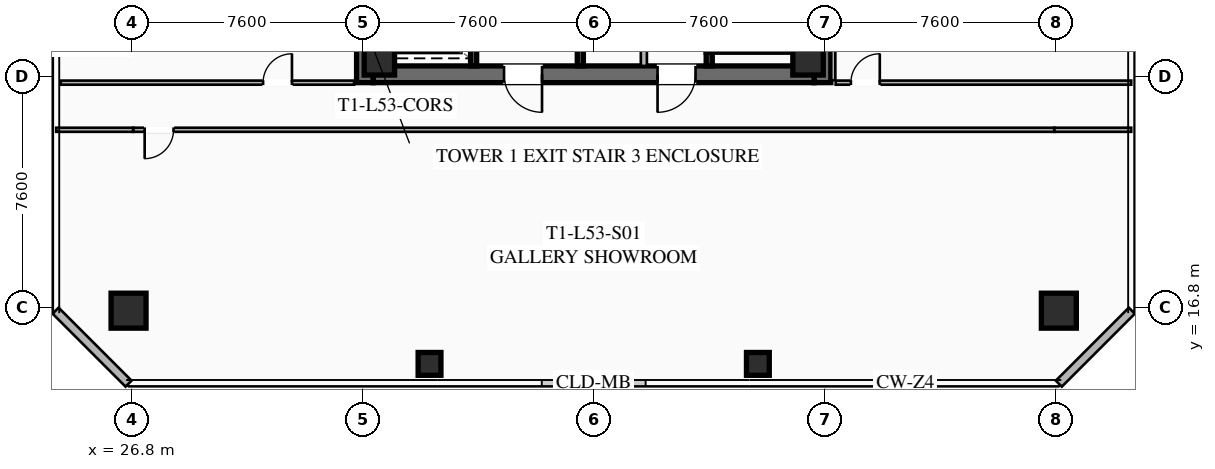
"""IFC4 building model, lengths in metres.
Left out: names, types, materials, properties, quantities, classifications, styles, units other than length and angle.
Written with IfcOpenShell. Run it as: python <this file> out.ifc"""

import sys

from ifc_helpers import new_model, si_unit, direction, frame, frame_2d, origin, origin_2d, place, context, subcontext, project, spatial, rectangle, hollow_rectangle, extrude, element, fill, save


model = new_model("IFC4")
c1 = context("Model", 3, precision=1e-05, world=origin(), true_north=direction((0.0, 1.0)))
c2 = subcontext(c1, "Body", "Model", "MODEL_VIEW")
j1 = project(units=[si_unit("LENGTHUNIT", "METRE"), si_unit("PLANEANGLEUNIT", "RADIAN")], contexts=[c1])
p1 = place(None, origin())
s1 = spatial("IfcSite", under=j1, at=p1, CompositionType="ELEMENT")
p2 = place(p1, origin())
s2 = spatial("IfcBuilding", under=s1, at=p2, CompositionType="ELEMENT")
p3 = place(p2, frame((0.0, 0.0, 196.05)))
s3 = spatial("IfcBuildingStorey", under=s2, at=p3, CompositionType="ELEMENT", Elevation=196.05)
for number, where, z_axis, x_axis in (
    (1, (34.475, 24.2, 0.0), (0.0, 0.0, 1.0), (0.0, 1.0, 0.0)),
    (2, (49.525, 39.8, 0.0), (0.0, 0.0, 1.0), (0.0, -1.0, 0.0)),
):
    element("IfcWall", number, at=place(p3, frame(where, z_axis=z_axis, x_axis=x_axis)), inside=s3, PredefinedType="SHEAR", context=c2, shape_type="SweptSolid", body=[
        extrude(rectangle(XDim=15.6, YDim=0.55, at=frame_2d((7.8, 0.0))), origin(), (0.0, 0.0, 1.0), 3.55),
    ])
p4 = place(p3, frame((49.25, 24.475, 0.0), z_axis=(0.0, 0.0, 1.0), x_axis=(-1.0, 0.0, 0.0)))
e3 = element("IfcWall", 3, at=p4, inside=s3, PredefinedType="SHEAR", context=c2, shape_type="SweptSolid", body=[
    extrude(rectangle(XDim=14.5, YDim=0.55, at=frame_2d((7.25, 0.0))), origin(), (0.0, 0.0, 1.0), 3.55),
])
p5 = place(p4, frame((8.95, 0.0, 0.0)))
e4 = element("IfcOpeningElement", 4, at=p5, cuts=e3, PredefinedType="OPENING", context=c2, shape_type="SweptSolid", body=[
    extrude(rectangle(XDim=1.25, YDim=2.25, at=frame_2d((0.625, 1.125))), frame((0.0, 0.285, 0.0), z_axis=(0.0, -1.0, 0.0), x_axis=(1.0, 0.0, 0.0)), (0.0, 0.0, 1.0), 0.57),
])
p6 = place(p4, frame((3.9, 0.0, 0.0)))
e5 = element("IfcOpeningElement", 5, at=p6, cuts=e3, PredefinedType="OPENING", context=c2, shape_type="SweptSolid", body=[
    extrude(rectangle(XDim=1.25, YDim=2.25, at=frame_2d((0.625, 1.125))), frame((0.0, 0.285, 0.0), z_axis=(0.0, -1.0, 0.0), x_axis=(1.0, 0.0, 0.0)), (0.0, 0.0, 1.0), 0.57),
])
for number, where, z_axis, x_axis in (
    (6, (34.95, 24.95, 0.0), (0.0, 0.0, 1.0), (1.0, 0.0, 0.0)),
    (7, (49.05, 24.95, 0.0), (0.0, 0.0, 1.0), (1.0, 0.0, 0.0)),
):
    element("IfcColumn", number, at=place(p3, frame(where, z_axis=z_axis, x_axis=x_axis)), inside=s3, PredefinedType="COLUMN", context=c2, shape_type="SweptSolid", body=[
        extrude(hollow_rectangle(XDim=1.0, YDim=1.0, WallThickness=0.04, at=origin_2d()), origin(), (0.0, 0.0, 1.0), 3.25),
    ])
for number, where, z_axis, x_axis in (
    (8, (26.7, 16.7, 0.0), (0.0, 0.0, 1.0), (1.0, 0.0, 0.0)),
    (9, (57.3, 16.7, 0.0), (0.0, 0.0, 1.0), (1.0, 0.0, 0.0)),
):
    element("IfcColumn", number, at=place(p3, frame(where, z_axis=z_axis, x_axis=x_axis)), inside=s3, PredefinedType="COLUMN", context=c2, shape_type="SweptSolid", body=[
        extrude(hollow_rectangle(XDim=1.15, YDim=1.15, WallThickness=0.045, at=origin_2d()), origin(), (0.0, 0.0, 1.0), 3.25),
    ])
for number, where, z_axis, x_axis in (
    (10, (36.6, 14.95, 0.0), (0.0, 0.0, 1.0), (1.0, 0.0, 0.0)),
    (11, (47.4, 14.95, 0.0), (0.0, 0.0, 1.0), (1.0, 0.0, 0.0)),
):
    element("IfcColumn", number, at=place(p3, frame(where, z_axis=z_axis, x_axis=x_axis)), inside=s3, PredefinedType="COLUMN", context=c2, shape_type="SweptSolid", body=[
        extrude(hollow_rectangle(XDim=0.75, YDim=0.75, WallThickness=0.032, at=origin_2d()), origin(), (0.0, 0.0, 1.0), 3.25),
    ])
for number, where, z_axis, x_axis in (
    (12, (26.7, 14.3, 0.0), (0.0, 0.0, 1.0), (-0.707, 0.707, 0.0)),
    (13, (59.7, 16.7, 0.0), (0.0, 0.0, 1.0), (-0.707, -0.707, 0.0)),
):
    element("IfcWall", number, at=place(p3, frame(where, z_axis=z_axis, x_axis=x_axis)), inside=s3, PredefinedType="SOLIDWALL", context=c2, shape_type="SweptSolid", body=[
        extrude(rectangle(XDim=3.394, YDim=0.28, at=frame_2d((1.697, 0.0))), origin(), (0.0, 0.0, 1.0), 3.25),
    ])
p7 = place(p3, frame((45.8, 32.8, 0.0), z_axis=(0.0, 0.0, 1.0), x_axis=(0.0, -1.0, 0.0)))
e14 = element("IfcWall", 14, at=p7, inside=s3, PredefinedType="SHEAR", context=c2, shape_type="SweptSolid", body=[
    extrude(rectangle(XDim=8.05, YDim=0.2, at=frame_2d((4.025, 0.0))), origin(), (0.0, 0.0, 1.0), 3.25),
])
p8 = place(p7, frame((0.45, 0.0, 0.0)))
e15 = element("IfcOpeningElement", 15, at=p8, cuts=e14, PredefinedType="OPENING", context=c2, shape_type="SweptSolid", body=[
    extrude(rectangle(XDim=1.15, YDim=2.2, at=frame_2d((0.575, 1.1))), frame((0.0, 0.11, 0.0), z_axis=(0.0, -1.0, 0.0), x_axis=(1.0, 0.0, 0.0)), (0.0, 0.0, 1.0), 0.22),
])
p9 = place(p3, frame((41.56, 24.75, 0.0), z_axis=(0.0, 0.0, 1.0), x_axis=(0.0, 1.0, 0.0)))
e16 = element("IfcWall", 16, at=p9, inside=s3, PredefinedType="SHEAR", context=c2, shape_type="SweptSolid", body=[
    extrude(rectangle(XDim=14.5, YDim=0.2, at=frame_2d((7.25, 0.0))), origin(), (0.0, 0.0, 1.0), 3.25),
])
p10 = place(p3, frame((38.05, 24.75, 0.0), z_axis=(0.0, 0.0, 1.0), x_axis=(0.0, 1.0, 0.0)))
e17 = element("IfcWall", 17, at=p10, inside=s3, PredefinedType="SHEAR", context=c2, shape_type="SweptSolid", body=[
    extrude(rectangle(XDim=6.45, YDim=0.2, at=frame_2d((3.225, 0.0))), origin(), (0.0, 0.0, 1.0), 3.25),
])
p11 = place(p10, frame((4.875, 0.0, 0.0)))
e18 = element("IfcOpeningElement", 18, at=p11, cuts=e17, PredefinedType="OPENING", context=c2, shape_type="SweptSolid", body=[
    extrude(rectangle(XDim=1.3, YDim=2.25, at=frame_2d((0.65, 1.125))), frame((0.0, 0.11, 0.0), z_axis=(0.0, -1.0, 0.0), x_axis=(1.0, 0.0, 0.0)), (0.0, 0.0, 1.0), 0.22),
])
p12 = place(p10, frame((2.875, 0.0, 0.0)))
e19 = element("IfcOpeningElement", 19, at=p12, cuts=e17, PredefinedType="OPENING", context=c2, shape_type="SweptSolid", body=[
    extrude(rectangle(XDim=1.3, YDim=2.25, at=frame_2d((0.65, 1.125))), frame((0.0, 0.11, 0.0), z_axis=(0.0, -1.0, 0.0), x_axis=(1.0, 0.0, 0.0)), (0.0, 0.0, 1.0), 0.22),
])
p13 = place(p10, frame((0.675, 0.0, 0.0)))
e20 = element("IfcOpeningElement", 20, at=p13, cuts=e17, PredefinedType="OPENING", context=c2, shape_type="SweptSolid", body=[
    extrude(rectangle(XDim=1.3, YDim=2.25, at=frame_2d((0.65, 1.125))), frame((0.0, 0.11, 0.0), z_axis=(0.0, -1.0, 0.0), x_axis=(1.0, 0.0, 0.0)), (0.0, 0.0, 1.0), 0.22),
])
p14 = place(p3, frame((43.65, 24.75, 0.0), z_axis=(0.0, 0.0, 1.0), x_axis=(0.0, 1.0, 0.0)))
e21 = element("IfcWall", 21, at=p14, inside=s3, PredefinedType="SOLIDWALL", context=c2, shape_type="SweptSolid", body=[
    extrude(rectangle(XDim=6.9, YDim=0.2, at=frame_2d((3.45, 0.0))), origin(), (0.0, 0.0, 1.0), 2.393),
])
p15 = place(p14, frame((0.85, 0.0, 0.0)))
e22 = element("IfcOpeningElement", 22, at=p15, cuts=e21, PredefinedType="OPENING", context=c2, shape_type="SweptSolid", body=[
    extrude(rectangle(XDim=0.95, YDim=2.05, at=frame_2d((0.475, 1.025))), frame((0.0, 0.11, 0.0), z_axis=(0.0, -1.0, 0.0), x_axis=(1.0, 0.0, 0.0)), (0.0, 0.0, 1.0), 0.22),
])
p16 = place(p14, frame((4.8, 0.0, 0.0)))
e23 = element("IfcOpeningElement", 23, at=p16, cuts=e21, PredefinedType="OPENING", context=c2, shape_type="SweptSolid", body=[
    extrude(rectangle(XDim=1.05, YDim=2.2, at=frame_2d((0.525, 1.1))), frame((0.0, 0.11, 0.0), z_axis=(0.0, -1.0, 0.0), x_axis=(1.0, 0.0, 0.0)), (0.0, 0.0, 1.0), 0.22),
])
p17 = place(p3, frame((57.15, 22.65, 0.0), z_axis=(0.0, 0.0, 1.0), x_axis=(-1.0, 0.0, 0.0)))
e24 = element("IfcWall", 24, at=p17, inside=s3, PredefinedType="PARTITIONING", context=c2, shape_type="SweptSolid", body=[
    extrude(rectangle(XDim=30.3, YDim=0.135, at=frame_2d((15.15, 0.0))), origin(), (0.0, 0.0, 1.0), 2.393),
])
p18 = place(p17, frame((28.97, 0.0, 0.0)))
e25 = element("IfcOpeningElement", 25, at=p18, cuts=e24, PredefinedType="OPENING", context=c2, shape_type="SweptSolid", body=[
    extrude(rectangle(XDim=0.95, YDim=2.05, at=frame_2d((0.475, 1.025))), frame((0.0, 0.077, 0.0), z_axis=(0.0, -1.0, 0.0), x_axis=(1.0, 0.0, 0.0)), (0.0, 0.0, 1.0), 0.155),
])
for number, where, z_axis, x_axis in (
    (26, (24.32, 22.65, 0.0), (0.0, 0.0, 1.0), (1.0, 0.0, 0.0)),
    (27, (57.15, 22.65, 0.0), (0.0, 0.0, 1.0), (1.0, 0.0, 0.0)),
):
    element("IfcWall", number, at=place(p3, frame(where, z_axis=z_axis, x_axis=x_axis)), inside=s3, PredefinedType="PARTITIONING", context=c2, shape_type="SweptSolid", body=[
        extrude(rectangle(XDim=2.53, YDim=0.135, at=frame_2d((1.265, 0.0))), origin(), (0.0, 0.0, 1.0), 2.393),
    ])
p19 = place(p3, frame((49.88, 39.72, 0.0), z_axis=(0.0, 0.0, 1.0), x_axis=(0.0, -1.0, 0.0)))
e28 = element("IfcWall", 28, at=p19, inside=s3, PredefinedType="PARTITIONING", context=c2, shape_type="SweptSolid", body=[
    extrude(rectangle(XDim=15.44, YDim=0.135, at=frame_2d((7.72, 0.0))), origin(), (0.0, 0.0, 1.0), 2.393),
])
p20 = place(p3, frame((49.96, 24.2, 0.0), z_axis=(0.0, 0.0, 1.0), x_axis=(1.0, 0.0, 0.0)))
e29 = element("IfcWall", 29, at=p20, inside=s3, PredefinedType="PARTITIONING", context=c2, shape_type="SweptSolid", body=[
    extrude(rectangle(XDim=9.72, YDim=0.135, at=frame_2d((4.86, 0.0))), origin(), (0.0, 0.0, 1.0), 2.393),
])
p21 = place(p20, frame((0.5, 0.0, 0.0)))
e30 = element("IfcOpeningElement", 30, at=p21, cuts=e29, PredefinedType="OPENING", context=c2, shape_type="SweptSolid", body=[
    extrude(rectangle(XDim=0.95, YDim=2.05, at=frame_2d((0.475, 1.025))), frame((0.0, 0.077, 0.0), z_axis=(0.0, -1.0, 0.0), x_axis=(1.0, 0.0, 0.0)), (0.0, 0.0, 1.0), 0.155),
])
p22 = place(p3, frame((24.47, 24.2, 0.0), z_axis=(0.0, 0.0, 1.0), x_axis=(1.0, 0.0, 0.0)))
e31 = element("IfcWall", 31, at=p22, inside=s3, PredefinedType="PARTITIONING", context=c2, shape_type="SweptSolid", body=[
    extrude(rectangle(XDim=9.65, YDim=0.135, at=frame_2d((4.825, 0.0))), origin(), (0.0, 0.0, 1.0), 2.393),
])
p23 = place(p22, frame((6.655, 0.0, 0.0)))
e32 = element("IfcOpeningElement", 32, at=p23, cuts=e31, PredefinedType="OPENING", context=c2, shape_type="SweptSolid", body=[
    extrude(rectangle(XDim=0.95, YDim=2.05, at=frame_2d((0.475, 1.025))), frame((0.0, 0.077, 0.0), z_axis=(0.0, -1.0, 0.0), x_axis=(1.0, 0.0, 0.0)), (0.0, 0.0, 1.0), 0.155),
])
p24 = place(p5, origin())
e33 = element("IfcDoor", 33, at=p24, inside=s3, OperationType="SINGLE_SWING_LEFT", PredefinedType="DOOR", context=c2, shape_type="SweptSolid", body=[
    extrude(rectangle(XDim=1.25, YDim=2.25, at=frame_2d((0.625, 1.125))), frame((0.0, 0.025, 0.0), z_axis=(0.0, -1.0, 0.0), x_axis=(1.0, 0.0, 0.0)), (0.0, 0.0, 1.0), 0.05),
])
fill(e4, e33)
p25 = place(p6, origin())
e34 = element("IfcDoor", 34, at=p25, inside=s3, OperationType="SINGLE_SWING_RIGHT", PredefinedType="DOOR", context=c2, shape_type="SweptSolid", body=[
    extrude(rectangle(XDim=1.25, YDim=2.25, at=frame_2d((0.625, 1.125))), frame((0.0, 0.025, 0.0), z_axis=(0.0, -1.0, 0.0), x_axis=(1.0, 0.0, 0.0)), (0.0, 0.0, 1.0), 0.05),
])
fill(e5, e34)
p26 = place(p18, origin())
e35 = element("IfcDoor", 35, at=p26, inside=s3, OperationType="SINGLE_SWING_RIGHT", PredefinedType="DOOR", context=c2, shape_type="SweptSolid", body=[
    extrude(rectangle(XDim=0.95, YDim=2.05, at=frame_2d((0.475, 1.025))), frame((0.0, 0.025, 0.0), z_axis=(0.0, -1.0, 0.0), x_axis=(1.0, 0.0, 0.0)), (0.0, 0.0, 1.0), 0.05),
])
fill(e25, e35)
p27 = place(p21, origin())
e36 = element("IfcDoor", 36, at=p27, inside=s3, OperationType="SINGLE_SWING_RIGHT", PredefinedType="DOOR", context=c2, shape_type="SweptSolid", body=[
    extrude(rectangle(XDim=0.95, YDim=2.05, at=frame_2d((0.475, 1.025))), frame((0.0, 0.025, 0.0), z_axis=(0.0, -1.0, 0.0), x_axis=(1.0, 0.0, 0.0)), (0.0, 0.0, 1.0), 0.05),
])
fill(e30, e36)
p28 = place(p23, origin())
e37 = element("IfcDoor", 37, at=p28, inside=s3, OperationType="SINGLE_SWING_RIGHT", PredefinedType="DOOR", context=c2, shape_type="SweptSolid", body=[
    extrude(rectangle(XDim=0.95, YDim=2.05, at=frame_2d((0.475, 1.025))), frame((0.0, 0.025, 0.0), z_axis=(0.0, -1.0, 0.0), x_axis=(1.0, 0.0, 0.0)), (0.0, 0.0, 1.0), 0.05),
])
fill(e32, e37)
save(model, sys.argv[1])
